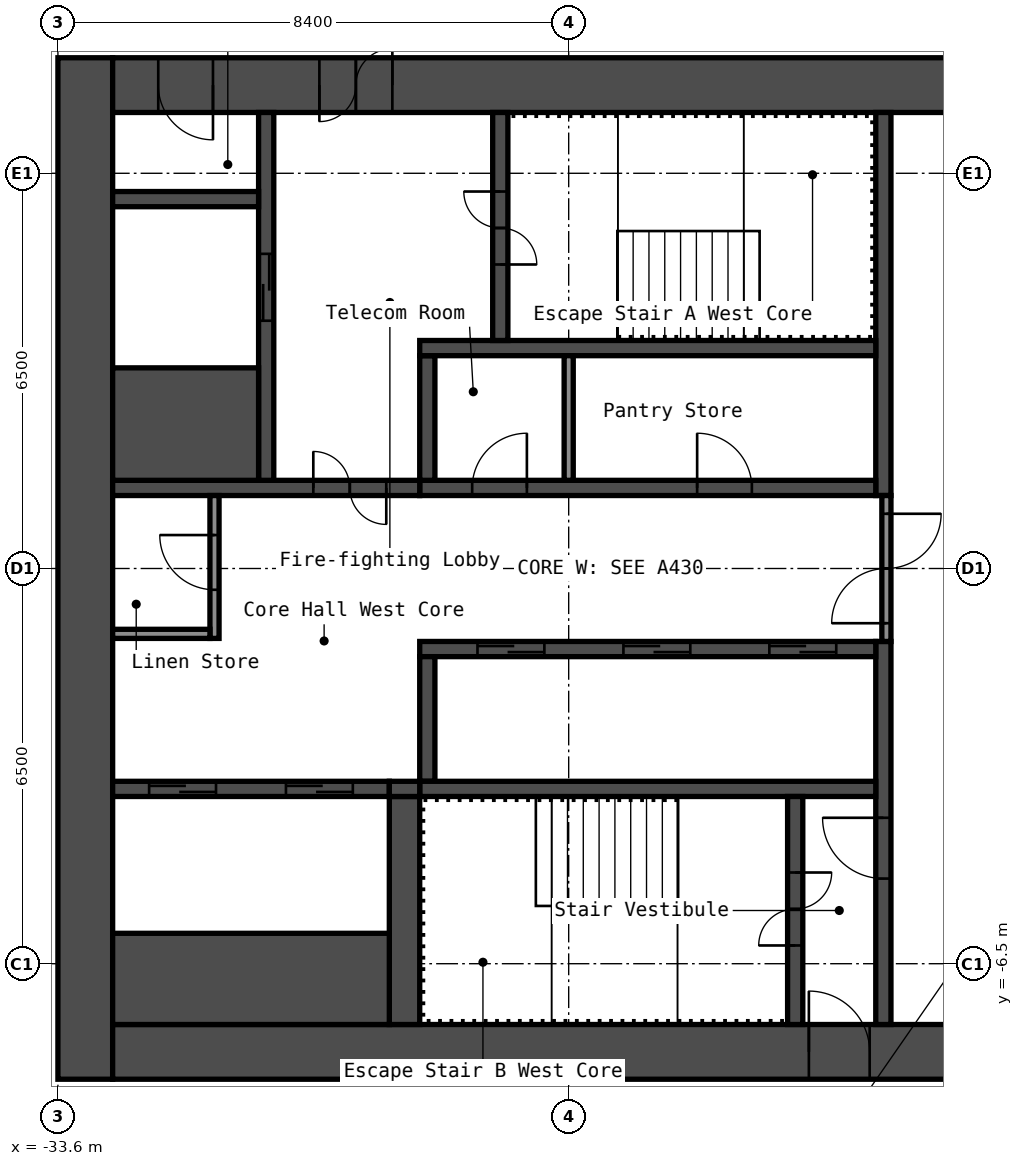
"""IFC4 building model, lengths in metres.
Left out: names, types, materials, properties, quantities, classifications, styles, units other than length and angle.
Written with IfcOpenShell. Run it as: python <this file> out.ifc"""

import sys

from ifc_helpers import new_model, si_unit, direction, frame, frame_2d, origin, place, context, subcontext, project, spatial, rectangle, extrude, element, fill, save


model = new_model("IFC4")
c1 = context("Model", 3, precision=1e-05, world=origin(), true_north=direction((0.0, 1.0)))
c2 = subcontext(c1, "Body", "Model", "MODEL_VIEW")
j1 = project(units=[si_unit("LENGTHUNIT", "METRE"), si_unit("PLANEANGLEUNIT", "RADIAN")], contexts=[c1])
p1 = place(None, origin())
s1 = spatial("IfcSite", under=j1, at=p1, CompositionType="ELEMENT")
p2 = place(p1, origin())
s2 = spatial("IfcBuilding", under=s1, at=p2, CompositionType="ELEMENT")
p3 = place(p2, frame((0.0, 0.0, 205.8)))
s3 = spatial("IfcBuildingStorey", under=s2, at=p3, CompositionType="ELEMENT", Elevation=205.8)
p4 = place(p3, frame((-33.15, -8.4, 0.0), z_axis=(0.0, 0.0, 1.0), x_axis=(0.0, 1.0, 0.0)))
e1 = element("IfcWall", 1, at=p4, inside=s3, PredefinedType="SHEAR", context=c2, shape_type="SweptSolid", body=[
    extrude(rectangle(XDim=16.8, YDim=0.9, at=frame_2d((8.4, 0.0))), origin(), (0.0, 0.0, 1.0), 2.75),
])
p5 = place(p3, frame((-32.7, 7.95, 0.0), z_axis=(0.0, 0.0, 1.0), x_axis=(1.0, 0.0, 0.0)))
e2 = element("IfcWall", 2, at=p5, inside=s3, PredefinedType="SHEAR", context=c2, shape_type="SweptSolid", body=[
    extrude(rectangle(XDim=15.0, YDim=0.9, at=frame_2d((7.5, 0.0))), origin(), (0.0, 0.0, 1.0), 2.75),
])
p6 = place(p5, frame((3.4, 0.0, 0.0)))
e3 = element("IfcOpeningElement", 3, at=p6, cuts=e2, PredefinedType="OPENING", context=c2, shape_type="SweptSolid", body=[
    extrude(rectangle(XDim=1.2, YDim=2.1, at=frame_2d((0.6, 1.05))), frame((0.0, 0.46, 0.0), z_axis=(0.0, -1.0, 0.0), x_axis=(1.0, 0.0, 0.0)), (0.0, 0.0, 1.0), 0.92),
])
p7 = place(p5, frame((0.75, 0.0, 0.0)))
e4 = element("IfcOpeningElement", 4, at=p7, cuts=e2, PredefinedType="OPENING", context=c2, shape_type="SweptSolid", body=[
    extrude(rectangle(XDim=0.9, YDim=2.1, at=frame_2d((0.45, 1.05))), frame((0.0, 0.46, 0.0), z_axis=(0.0, -1.0, 0.0), x_axis=(1.0, 0.0, 0.0)), (0.0, 0.0, 1.0), 0.92),
])
p8 = place(p3, frame((-32.7, -7.95, 0.0), z_axis=(0.0, 0.0, 1.0), x_axis=(1.0, 0.0, 0.0)))
e5 = element("IfcWall", 5, at=p8, inside=s3, PredefinedType="SHEAR", context=c2, shape_type="SweptSolid", body=[
    extrude(rectangle(XDim=15.0, YDim=0.9, at=frame_2d((7.5, 0.0))), origin(), (0.0, 0.0, 1.0), 2.75),
])
p9 = place(p8, frame((11.45, 0.0, 0.0)))
e6 = element("IfcOpeningElement", 6, at=p9, cuts=e5, PredefinedType="OPENING", context=c2, shape_type="SweptSolid", body=[
    extrude(rectangle(XDim=1.0, YDim=2.1, at=frame_2d((0.5, 1.05))), frame((0.0, 0.46, 0.0), z_axis=(0.0, -1.0, 0.0), x_axis=(1.0, 0.0, 0.0)), (0.0, 0.0, 1.0), 0.92),
])
p10 = place(p3, frame((-20.025, 1.2, 0.0), z_axis=(0.0, 0.0, 1.0), x_axis=(0.0, 1.0, 0.0)))
e7 = element("IfcWall", 7, at=p10, inside=s3, PredefinedType="SHEAR", context=c2, shape_type="SweptSolid", body=[
    extrude(rectangle(XDim=6.3, YDim=0.25, at=frame_2d((3.15, 0.0))), origin(), (0.0, 0.0, 1.0), 2.75),
])
p11 = place(p3, frame((-20.025, -7.5, 0.0), z_axis=(0.0, 0.0, 1.0), x_axis=(0.0, 1.0, 0.0)))
e8 = element("IfcWall", 8, at=p11, inside=s3, PredefinedType="SHEAR", context=c2, shape_type="SweptSolid", body=[
    extrude(rectangle(XDim=6.3, YDim=0.25, at=frame_2d((3.15, 0.0))), origin(), (0.0, 0.0, 1.0), 2.75),
])
p12 = place(p11, frame((2.4, 0.0, 0.0)))
e9 = element("IfcOpeningElement", 9, at=p12, cuts=e8, PredefinedType="OPENING", context=c2, shape_type="SweptSolid", body=[
    extrude(rectangle(XDim=1.0, YDim=2.1, at=frame_2d((0.5, 1.05))), frame((0.0, 0.135, 0.0), z_axis=(0.0, -1.0, 0.0), x_axis=(1.0, 0.0, 0.0)), (0.0, 0.0, 1.0), 0.27),
])
p13 = place(p3, frame((-27.65, 1.325, 0.0), z_axis=(0.0, 0.0, 1.0), x_axis=(1.0, 0.0, 0.0)))
e10 = element("IfcWall", 10, at=p13, inside=s3, PredefinedType="SHEAR", context=c2, shape_type="SweptSolid", body=[
    extrude(rectangle(XDim=7.5, YDim=0.25, at=frame_2d((3.75, 0.0))), origin(), (0.0, 0.0, 1.0), 2.75),
])
p14 = place(p13, frame((4.562, 0.0, 0.0)))
e11 = element("IfcOpeningElement", 11, at=p14, cuts=e10, PredefinedType="OPENING", context=c2, shape_type="SweptSolid", body=[
    extrude(rectangle(XDim=0.9, YDim=2.1, at=frame_2d((0.45, 1.05))), frame((0.0, 0.135, 0.0), z_axis=(0.0, -1.0, 0.0), x_axis=(1.0, 0.0, 0.0)), (0.0, 0.0, 1.0), 0.27),
])
p15 = place(p13, frame((0.863, 0.0, 0.0)))
e12 = element("IfcOpeningElement", 12, at=p15, cuts=e10, PredefinedType="OPENING", context=c2, shape_type="SweptSolid", body=[
    extrude(rectangle(XDim=0.9, YDim=2.1, at=frame_2d((0.45, 1.05))), frame((0.0, 0.135, 0.0), z_axis=(0.0, -1.0, 0.0), x_axis=(1.0, 0.0, 0.0)), (0.0, 0.0, 1.0), 0.27),
])
p16 = place(p3, frame((-27.525, 1.45, 0.0), z_axis=(0.0, 0.0, 1.0), x_axis=(0.0, 1.0, 0.0)))
e13 = element("IfcWall", 13, at=p16, inside=s3, PredefinedType="SHEAR", context=c2, shape_type="SweptSolid", body=[
    extrude(rectangle(XDim=2.05, YDim=0.25, at=frame_2d((1.025, 0.0))), origin(), (0.0, 0.0, 1.0), 2.75),
])
p17 = place(p3, frame((-27.65, 3.625, 0.0), z_axis=(0.0, 0.0, 1.0), x_axis=(1.0, 0.0, 0.0)))
e14 = element("IfcWall", 14, at=p17, inside=s3, PredefinedType="SHEAR", context=c2, shape_type="SweptSolid", body=[
    extrude(rectangle(XDim=7.5, YDim=0.25, at=frame_2d((3.75, 0.0))), origin(), (0.0, 0.0, 1.0), 2.75),
])
p18 = place(p3, frame((-26.325, 3.75, 0.0), z_axis=(0.0, 0.0, 1.0), x_axis=(0.0, 1.0, 0.0)))
e15 = element("IfcWall", 15, at=p18, inside=s3, PredefinedType="SHEAR", context=c2, shape_type="SweptSolid", body=[
    extrude(rectangle(XDim=3.75, YDim=0.25, at=frame_2d((1.875, 0.0))), origin(), (0.0, 0.0, 1.0), 2.75),
])
p19 = place(p18, frame((1.25, 0.0, 0.0)))
e16 = element("IfcOpeningElement", 16, at=p19, cuts=e15, PredefinedType="OPENING", context=c2, shape_type="SweptSolid", body=[
    extrude(rectangle(XDim=1.2, YDim=2.1, at=frame_2d((0.6, 1.05))), frame((0.0, 0.135, 0.0), z_axis=(0.0, -1.0, 0.0), x_axis=(1.0, 0.0, 0.0)), (0.0, 0.0, 1.0), 0.27),
])
p20 = place(p3, frame((-32.7, 1.325, 0.0), z_axis=(0.0, 0.0, 1.0), x_axis=(1.0, 0.0, 0.0)))
e17 = element("IfcWall", 17, at=p20, inside=s3, PredefinedType="SHEAR", context=c2, shape_type="SweptSolid", body=[
    extrude(rectangle(XDim=5.05, YDim=0.25, at=frame_2d((2.525, 0.0))), origin(), (0.0, 0.0, 1.0), 2.75),
])
p21 = place(p20, frame((3.3, 0.0, 0.0)))
e18 = element("IfcOpeningElement", 18, at=p21, cuts=e17, PredefinedType="OPENING", context=c2, shape_type="SweptSolid", body=[
    extrude(rectangle(XDim=1.2, YDim=2.1, at=frame_2d((0.6, 1.05))), frame((0.0, 0.135, 0.0), z_axis=(0.0, -1.0, 0.0), x_axis=(1.0, 0.0, 0.0)), (0.0, 0.0, 1.0), 0.27),
])
p22 = place(p3, frame((-30.175, 1.45, 0.0), z_axis=(0.0, 0.0, 1.0), x_axis=(0.0, 1.0, 0.0)))
e19 = element("IfcWall", 19, at=p22, inside=s3, PredefinedType="SHEAR", context=c2, shape_type="SweptSolid", body=[
    extrude(rectangle(XDim=6.05, YDim=0.25, at=frame_2d((3.025, 0.0))), origin(), (0.0, 0.0, 1.0), 2.75),
])
p23 = place(p22, frame((2.625, 0.0, 0.0)))
e20 = element("IfcOpeningElement", 20, at=p23, cuts=e19, PredefinedType="OPENING", context=c2, shape_type="SweptSolid", body=[
    extrude(rectangle(XDim=1.1, YDim=2.1, at=frame_2d((0.55, 1.05))), frame((0.0, 0.135, 0.0), z_axis=(0.0, -1.0, 0.0), x_axis=(1.0, 0.0, 0.0)), (0.0, 0.0, 1.0), 0.27),
])
p24 = place(p3, frame((-32.7, 2.375, 0.0), z_axis=(0.0, 0.0, 1.0), x_axis=(1.0, 0.0, 0.0)))
e21 = element("IfcWall", 21, at=p24, inside=s3, PredefinedType="SHEAR", context=c2, shape_type="SweptSolid", body=[
    extrude(rectangle(XDim=2.4, YDim=1.85, at=frame_2d((1.2, 0.0))), origin(), (0.0, 0.0, 1.0), 2.75),
])
p25 = place(p3, frame((-32.7, 6.075, 0.0), z_axis=(0.0, 0.0, 1.0), x_axis=(1.0, 0.0, 0.0)))
e22 = element("IfcWall", 22, at=p25, inside=s3, PredefinedType="SHEAR", context=c2, shape_type="SweptSolid", body=[
    extrude(rectangle(XDim=2.4, YDim=0.25, at=frame_2d((1.2, 0.0))), origin(), (0.0, 0.0, 1.0), 2.75),
])
p26 = place(p3, frame((-27.65, -1.325, 0.0), z_axis=(0.0, 0.0, 1.0), x_axis=(1.0, 0.0, 0.0)))
e23 = element("IfcWall", 23, at=p26, inside=s3, PredefinedType="SHEAR", context=c2, shape_type="SweptSolid", body=[
    extrude(rectangle(XDim=7.5, YDim=0.25, at=frame_2d((3.75, 0.0))), origin(), (0.0, 0.0, 1.0), 2.75),
])
p27 = place(p26, frame((5.75, 0.0, 0.0)))
e24 = element("IfcOpeningElement", 24, at=p27, cuts=e23, PredefinedType="OPENING", context=c2, shape_type="SweptSolid", body=[
    extrude(rectangle(XDim=1.1, YDim=2.1, at=frame_2d((0.55, 1.05))), frame((0.0, 0.135, 0.0), z_axis=(0.0, -1.0, 0.0), x_axis=(1.0, 0.0, 0.0)), (0.0, 0.0, 1.0), 0.27),
])
p28 = place(p26, frame((3.35, 0.0, 0.0)))
e25 = element("IfcOpeningElement", 25, at=p28, cuts=e23, PredefinedType="OPENING", context=c2, shape_type="SweptSolid", body=[
    extrude(rectangle(XDim=1.1, YDim=2.1, at=frame_2d((0.55, 1.05))), frame((0.0, 0.135, 0.0), z_axis=(0.0, -1.0, 0.0), x_axis=(1.0, 0.0, 0.0)), (0.0, 0.0, 1.0), 0.27),
])
p29 = place(p26, frame((0.95, 0.0, 0.0)))
e26 = element("IfcOpeningElement", 26, at=p29, cuts=e23, PredefinedType="OPENING", context=c2, shape_type="SweptSolid", body=[
    extrude(rectangle(XDim=1.1, YDim=2.1, at=frame_2d((0.55, 1.05))), frame((0.0, 0.135, 0.0), z_axis=(0.0, -1.0, 0.0), x_axis=(1.0, 0.0, 0.0)), (0.0, 0.0, 1.0), 0.27),
])
p30 = place(p3, frame((-27.525, -3.5, 0.0), z_axis=(0.0, 0.0, 1.0), x_axis=(0.0, 1.0, 0.0)))
e27 = element("IfcWall", 27, at=p30, inside=s3, PredefinedType="SHEAR", context=c2, shape_type="SweptSolid", body=[
    extrude(rectangle(XDim=2.05, YDim=0.25, at=frame_2d((1.025, 0.0))), origin(), (0.0, 0.0, 1.0), 2.75),
])
p31 = place(p3, frame((-27.65, -3.625, 0.0), z_axis=(0.0, 0.0, 1.0), x_axis=(1.0, 0.0, 0.0)))
e28 = element("IfcWall", 28, at=p31, inside=s3, PredefinedType="SHEAR", context=c2, shape_type="SweptSolid", body=[
    extrude(rectangle(XDim=7.5, YDim=0.25, at=frame_2d((3.75, 0.0))), origin(), (0.0, 0.0, 1.0), 2.75),
])
p32 = place(p3, frame((-21.475, -7.5, 0.0), z_axis=(0.0, 0.0, 1.0), x_axis=(0.0, 1.0, 0.0)))
e29 = element("IfcWall", 29, at=p32, inside=s3, PredefinedType="SHEAR", context=c2, shape_type="SweptSolid", body=[
    extrude(rectangle(XDim=3.75, YDim=0.25, at=frame_2d((1.875, 0.0))), origin(), (0.0, 0.0, 1.0), 2.75),
])
p33 = place(p32, frame((1.3, 0.0, 0.0)))
e30 = element("IfcOpeningElement", 30, at=p33, cuts=e29, PredefinedType="OPENING", context=c2, shape_type="SweptSolid", body=[
    extrude(rectangle(XDim=1.2, YDim=2.1, at=frame_2d((0.6, 1.05))), frame((0.0, 0.135, 0.0), z_axis=(0.0, -1.0, 0.0), x_axis=(1.0, 0.0, 0.0)), (0.0, 0.0, 1.0), 0.27),
])
p34 = place(p3, frame((-27.9, -7.5, 0.0), z_axis=(0.0, 0.0, 1.0), x_axis=(0.0, 1.0, 0.0)))
e31 = element("IfcWall", 31, at=p34, inside=s3, PredefinedType="SHEAR", context=c2, shape_type="SweptSolid", body=[
    extrude(rectangle(XDim=3.75, YDim=0.5, at=frame_2d((1.875, 0.0))), origin(), (0.0, 0.0, 1.0), 2.75),
])
p35 = place(p3, frame((-32.7, -3.625, 0.0), z_axis=(0.0, 0.0, 1.0), x_axis=(1.0, 0.0, 0.0)))
e32 = element("IfcWall", 32, at=p35, inside=s3, PredefinedType="SHEAR", context=c2, shape_type="SweptSolid", body=[
    extrude(rectangle(XDim=4.55, YDim=0.25, at=frame_2d((2.275, 0.0))), origin(), (0.0, 0.0, 1.0), 2.75),
])
p36 = place(p35, frame((2.85, 0.0, 0.0)))
e33 = element("IfcOpeningElement", 33, at=p36, cuts=e32, PredefinedType="OPENING", context=c2, shape_type="SweptSolid", body=[
    extrude(rectangle(XDim=1.1, YDim=2.1, at=frame_2d((0.55, 1.05))), frame((0.0, 0.135, 0.0), z_axis=(0.0, -1.0, 0.0), x_axis=(1.0, 0.0, 0.0)), (0.0, 0.0, 1.0), 0.27),
])
p37 = place(p35, frame((0.6, 0.0, 0.0)))
e34 = element("IfcOpeningElement", 34, at=p37, cuts=e32, PredefinedType="OPENING", context=c2, shape_type="SweptSolid", body=[
    extrude(rectangle(XDim=1.1, YDim=2.1, at=frame_2d((0.55, 1.05))), frame((0.0, 0.135, 0.0), z_axis=(0.0, -1.0, 0.0), x_axis=(1.0, 0.0, 0.0)), (0.0, 0.0, 1.0), 0.27),
])
p38 = place(p3, frame((-32.7, -6.75, 0.0), z_axis=(0.0, 0.0, 1.0), x_axis=(1.0, 0.0, 0.0)))
e35 = element("IfcWall", 35, at=p38, inside=s3, PredefinedType="SHEAR", context=c2, shape_type="SweptSolid", body=[
    extrude(rectangle(XDim=4.55, YDim=1.5, at=frame_2d((2.275, 0.0))), origin(), (0.0, 0.0, 1.0), 2.75),
])
p39 = place(p3, frame((-28.15, -3.625, 0.0), z_axis=(0.0, 0.0, 1.0), x_axis=(1.0, 0.0, 0.0)))
e36 = element("IfcWall", 36, at=p39, inside=s3, PredefinedType="SHEAR", context=c2, shape_type="SweptSolid", body=[
    extrude(rectangle(XDim=0.5, YDim=0.25, at=frame_2d((0.25, 0.0))), origin(), (0.0, 0.0, 1.0), 2.75),
])
p40 = place(p3, frame((-19.975, -1.2, 0.0), z_axis=(0.0, 0.0, 1.0), x_axis=(0.0, 1.0, 0.0)))
e37 = element("IfcWall", 37, at=p40, inside=s3, PredefinedType="PARTITIONING", context=c2, shape_type="SweptSolid", body=[
    extrude(rectangle(XDim=2.4, YDim=0.15, at=frame_2d((1.2, 0.0))), origin(), (0.0, 0.0, 1.0), 2.75),
])
p41 = place(p40, frame((0.3, 0.0, 0.0)))
e38 = element("IfcOpeningElement", 38, at=p41, cuts=e37, PredefinedType="OPENING", context=c2, shape_type="SweptSolid", body=[
    extrude(rectangle(XDim=1.8, YDim=2.1, at=frame_2d((0.9, 1.05))), frame((0.0, 0.085, 0.0), z_axis=(0.0, -1.0, 0.0), x_axis=(1.0, 0.0, 0.0)), (0.0, 0.0, 1.0), 0.17),
])
p42 = place(p3, frame((-31.025, -1.15, 0.0), z_axis=(0.0, 0.0, 1.0), x_axis=(0.0, 1.0, 0.0)))
e39 = element("IfcWall", 39, at=p42, inside=s3, PredefinedType="PARTITIONING", context=c2, shape_type="SweptSolid", body=[
    extrude(rectangle(XDim=2.35, YDim=0.15, at=frame_2d((1.175, 0.0))), origin(), (0.0, 0.0, 1.0), 2.75),
])
p43 = place(p42, frame((0.8, 0.0, 0.0)))
e40 = element("IfcOpeningElement", 40, at=p43, cuts=e39, PredefinedType="OPENING", context=c2, shape_type="SweptSolid", body=[
    extrude(rectangle(XDim=0.9, YDim=2.1, at=frame_2d((0.45, 1.05))), frame((0.0, 0.085, 0.0), z_axis=(0.0, -1.0, 0.0), x_axis=(1.0, 0.0, 0.0)), (0.0, 0.0, 1.0), 0.17),
])
p44 = place(p3, frame((-32.7, -1.075, 0.0), z_axis=(0.0, 0.0, 1.0), x_axis=(1.0, 0.0, 0.0)))
e41 = element("IfcWall", 41, at=p44, inside=s3, PredefinedType="PARTITIONING", context=c2, shape_type="SweptSolid", body=[
    extrude(rectangle(XDim=1.6, YDim=0.15, at=frame_2d((0.8, 0.0))), origin(), (0.0, 0.0, 1.0), 2.75),
])
p45 = place(p3, frame((-25.2, 1.45, 0.0), z_axis=(0.0, 0.0, 1.0), x_axis=(0.0, 1.0, 0.0)))
e42 = element("IfcWall", 42, at=p45, inside=s3, PredefinedType="PARTITIONING", context=c2, shape_type="SweptSolid", body=[
    extrude(rectangle(XDim=2.05, YDim=0.15, at=frame_2d((1.025, 0.0))), origin(), (0.0, 0.0, 1.0), 2.75),
])
p46 = place(p6, origin())
e43 = element("IfcDoor", 43, at=p46, inside=s3, OperationType="DOUBLE_DOOR_SINGLE_SWING", PredefinedType="DOOR", context=c2, shape_type="SweptSolid", body=[
    extrude(rectangle(XDim=1.2, YDim=2.1, at=frame_2d((0.6, 1.05))), frame((0.0, 0.025, 0.0), z_axis=(0.0, -1.0, 0.0), x_axis=(1.0, 0.0, 0.0)), (0.0, 0.0, 1.0), 0.05),
])
fill(e3, e43)
p47 = place(p7, origin())
e44 = element("IfcDoor", 44, at=p47, inside=s3, OperationType="SINGLE_SWING_RIGHT", PredefinedType="DOOR", context=c2, shape_type="SweptSolid", body=[
    extrude(rectangle(XDim=0.9, YDim=2.1, at=frame_2d((0.45, 1.05))), frame((0.0, 0.025, 0.0), z_axis=(0.0, -1.0, 0.0), x_axis=(1.0, 0.0, 0.0)), (0.0, 0.0, 1.0), 0.05),
])
fill(e4, e44)
p48 = place(p9, origin())
e45 = element("IfcDoor", 45, at=p48, inside=s3, OperationType="SINGLE_SWING_RIGHT", PredefinedType="DOOR", context=c2, shape_type="SweptSolid", body=[
    extrude(rectangle(XDim=1.0, YDim=2.1, at=frame_2d((0.5, 1.05))), frame((0.0, 0.025, 0.0), z_axis=(0.0, -1.0, 0.0), x_axis=(1.0, 0.0, 0.0)), (0.0, 0.0, 1.0), 0.05),
])
fill(e6, e45)
p49 = place(p19, origin())
e46 = element("IfcDoor", 46, at=p49, inside=s3, OperationType="DOUBLE_DOOR_SINGLE_SWING", PredefinedType="DOOR", context=c2, shape_type="SweptSolid", body=[
    extrude(rectangle(XDim=1.2, YDim=2.1, at=frame_2d((0.6, 1.05))), frame((0.0, 0.025, 0.0), z_axis=(0.0, -1.0, 0.0), x_axis=(1.0, 0.0, 0.0)), (0.0, 0.0, 1.0), 0.05),
])
fill(e16, e46)
p50 = place(p33, origin())
e47 = element("IfcDoor", 47, at=p50, inside=s3, OperationType="DOUBLE_DOOR_SINGLE_SWING", PredefinedType="DOOR", context=c2, shape_type="SweptSolid", body=[
    extrude(rectangle(XDim=1.2, YDim=2.1, at=frame_2d((0.6, 1.05))), frame((0.0, 0.025, 0.0), z_axis=(0.0, -1.0, 0.0), x_axis=(1.0, 0.0, 0.0)), (0.0, 0.0, 1.0), 0.05),
])
fill(e30, e47)
p51 = place(p12, origin())
e48 = element("IfcDoor", 48, at=p51, inside=s3, OperationType="SINGLE_SWING_LEFT", PredefinedType="DOOR", context=c2, shape_type="SweptSolid", body=[
    extrude(rectangle(XDim=1.0, YDim=2.1, at=frame_2d((0.5, 1.05))), frame((0.0, 0.025, 0.0), z_axis=(0.0, -1.0, 0.0), x_axis=(1.0, 0.0, 0.0)), (0.0, 0.0, 1.0), 0.05),
])
fill(e9, e48)
p52 = place(p21, origin())
e49 = element("IfcDoor", 49, at=p52, inside=s3, OperationType="DOUBLE_DOOR_SINGLE_SWING", PredefinedType="DOOR", context=c2, shape_type="SweptSolid", body=[
    extrude(rectangle(XDim=1.2, YDim=2.1, at=frame_2d((0.6, 1.05))), frame((0.0, 0.025, 0.0), z_axis=(0.0, -1.0, 0.0), x_axis=(1.0, 0.0, 0.0)), (0.0, 0.0, 1.0), 0.05),
])
fill(e18, e49)
p53 = place(p41, origin())
e50 = element("IfcDoor", 50, at=p53, inside=s3, OperationType="DOUBLE_DOOR_SINGLE_SWING", PredefinedType="DOOR", context=c2, shape_type="SweptSolid", body=[
    extrude(rectangle(XDim=1.8, YDim=2.1, at=frame_2d((0.9, 1.05))), frame((0.0, 0.025, 0.0), z_axis=(0.0, -1.0, 0.0), x_axis=(1.0, 0.0, 0.0)), (0.0, 0.0, 1.0), 0.05),
])
fill(e38, e50)
p54 = place(p43, origin())
e51 = element("IfcDoor", 51, at=p54, inside=s3, OperationType="SINGLE_SWING_LEFT", PredefinedType="DOOR", context=c2, shape_type="SweptSolid", body=[
    extrude(rectangle(XDim=0.9, YDim=2.1, at=frame_2d((0.45, 1.05))), frame((0.0, 0.025, 0.0), z_axis=(0.0, -1.0, 0.0), x_axis=(1.0, 0.0, 0.0)), (0.0, 0.0, 1.0), 0.05),
])
fill(e40, e51)
p55 = place(p14, origin())
e52 = element("IfcDoor", 52, at=p55, inside=s3, OperationType="SINGLE_SWING_RIGHT", PredefinedType="DOOR", context=c2, shape_type="SweptSolid", body=[
    extrude(rectangle(XDim=0.9, YDim=2.1, at=frame_2d((0.45, 1.05))), frame((0.0, 0.025, 0.0), z_axis=(0.0, -1.0, 0.0), x_axis=(1.0, 0.0, 0.0)), (0.0, 0.0, 1.0), 0.05),
])
fill(e11, e52)
p56 = place(p15, origin())
e53 = element("IfcDoor", 53, at=p56, inside=s3, OperationType="SINGLE_SWING_LEFT", PredefinedType="DOOR", context=c2, shape_type="SweptSolid", body=[
    extrude(rectangle(XDim=0.9, YDim=2.1, at=frame_2d((0.45, 1.05))), frame((0.0, 0.025, 0.0), z_axis=(0.0, -1.0, 0.0), x_axis=(1.0, 0.0, 0.0)), (0.0, 0.0, 1.0), 0.05),
])
fill(e12, e53)
p57 = place(p27, origin())
e54 = element("IfcDoor", 54, at=p57, inside=s3, OperationType="DOUBLE_DOOR_SLIDING", PredefinedType="DOOR", context=c2, shape_type="SweptSolid", body=[
    extrude(rectangle(XDim=1.1, YDim=2.1, at=frame_2d((0.55, 1.05))), frame((0.0, 0.025, 0.0), z_axis=(0.0, -1.0, 0.0), x_axis=(1.0, 0.0, 0.0)), (0.0, 0.0, 1.0), 0.05),
])
fill(e24, e54)
p58 = place(p28, origin())
e55 = element("IfcDoor", 55, at=p58, inside=s3, OperationType="DOUBLE_DOOR_SLIDING", PredefinedType="DOOR", context=c2, shape_type="SweptSolid", body=[
    extrude(rectangle(XDim=1.1, YDim=2.1, at=frame_2d((0.55, 1.05))), frame((0.0, 0.025, 0.0), z_axis=(0.0, -1.0, 0.0), x_axis=(1.0, 0.0, 0.0)), (0.0, 0.0, 1.0), 0.05),
])
fill(e25, e55)
p59 = place(p29, origin())
e56 = element("IfcDoor", 56, at=p59, inside=s3, OperationType="DOUBLE_DOOR_SLIDING", PredefinedType="DOOR", context=c2, shape_type="SweptSolid", body=[
    extrude(rectangle(XDim=1.1, YDim=2.1, at=frame_2d((0.55, 1.05))), frame((0.0, 0.025, 0.0), z_axis=(0.0, -1.0, 0.0), x_axis=(1.0, 0.0, 0.0)), (0.0, 0.0, 1.0), 0.05),
])
fill(e26, e56)
p60 = place(p23, origin())
e57 = element("IfcDoor", 57, at=p60, inside=s3, OperationType="DOUBLE_DOOR_SLIDING", PredefinedType="DOOR", context=c2, shape_type="SweptSolid", body=[
    extrude(rectangle(XDim=1.1, YDim=2.1, at=frame_2d((0.55, 1.05))), frame((0.0, 0.025, 0.0), z_axis=(0.0, -1.0, 0.0), x_axis=(1.0, 0.0, 0.0)), (0.0, 0.0, 1.0), 0.05),
])
fill(e20, e57)
p61 = place(p36, origin())
e58 = element("IfcDoor", 58, at=p61, inside=s3, OperationType="DOUBLE_DOOR_SLIDING", PredefinedType="DOOR", context=c2, shape_type="SweptSolid", body=[
    extrude(rectangle(XDim=1.1, YDim=2.1, at=frame_2d((0.55, 1.05))), frame((0.0, 0.025, 0.0), z_axis=(0.0, -1.0, 0.0), x_axis=(1.0, 0.0, 0.0)), (0.0, 0.0, 1.0), 0.05),
])
fill(e33, e58)
p62 = place(p37, origin())
e59 = element("IfcDoor", 59, at=p62, inside=s3, OperationType="DOUBLE_DOOR_SLIDING", PredefinedType="DOOR", context=c2, shape_type="SweptSolid", body=[
    extrude(rectangle(XDim=1.1, YDim=2.1, at=frame_2d((0.55, 1.05))), frame((0.0, 0.025, 0.0), z_axis=(0.0, -1.0, 0.0), x_axis=(1.0, 0.0, 0.0)), (0.0, 0.0, 1.0), 0.05),
])
fill(e34, e59)
save(model, sys.argv[1])
